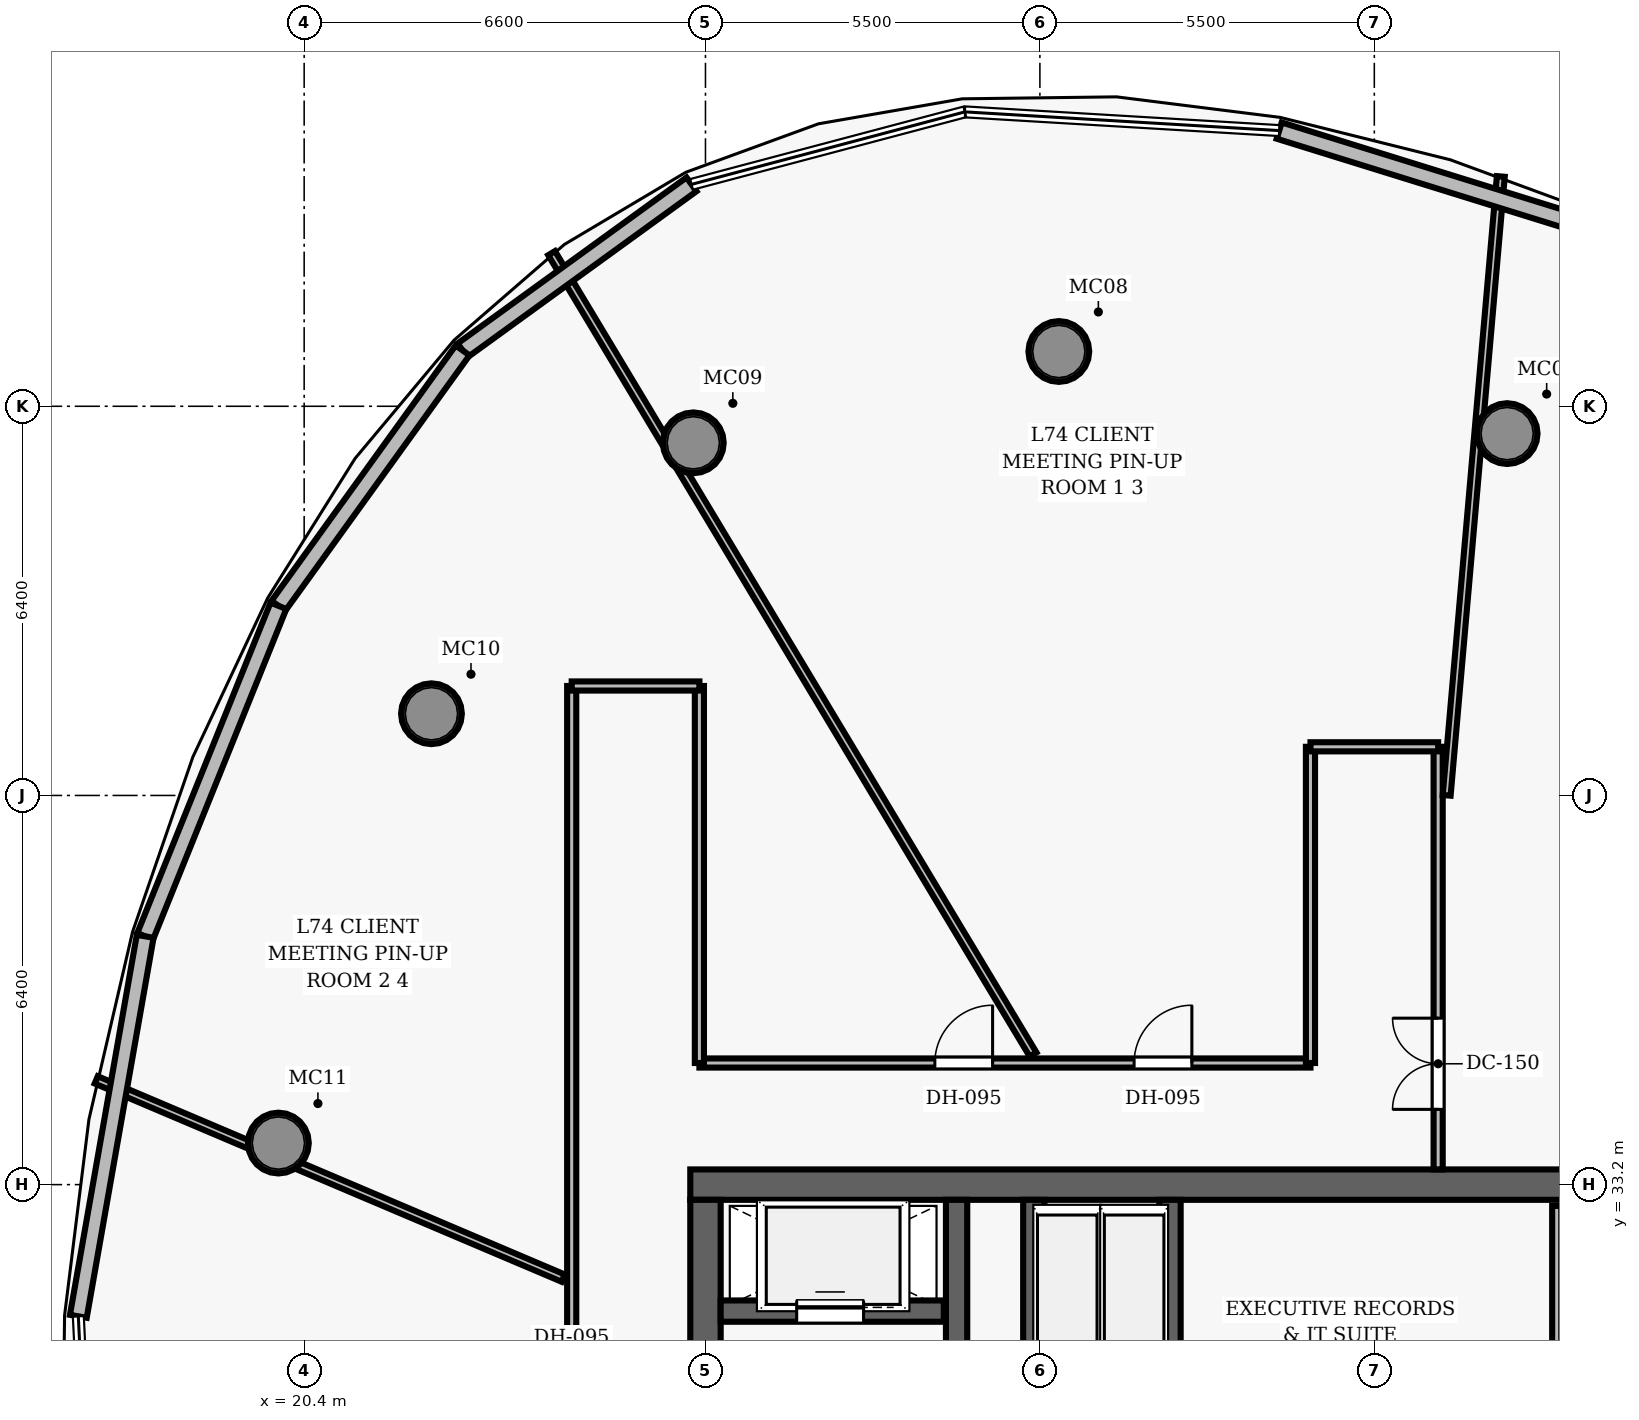
"""IFC4 building model, lengths in metres.
Left out: names, types, materials, properties, quantities, classifications, styles, units other than length and angle.
Written with IfcOpenShell. Run it as: python <this file> out.ifc"""

import sys

from ifc_helpers import new_model, si_unit, direction, frame, frame_2d, origin, origin_2d, place, context, subcontext, project, spatial, rectangle, hollow_circle, extrude, element, fill, save


model = new_model("IFC4")
c1 = context("Model", 3, precision=1e-05, world=origin(), true_north=direction((0.0, 1.0)))
c2 = subcontext(c1, "Body", "Model", "MODEL_VIEW")
j1 = project(units=[si_unit("LENGTHUNIT", "METRE"), si_unit("PLANEANGLEUNIT", "RADIAN")], contexts=[c1])
p1 = place(None, origin())
s1 = spatial("IfcSite", under=j1, at=p1, CompositionType="ELEMENT")
p2 = place(p1, origin())
s2 = spatial("IfcBuilding", under=s1, at=p2, CompositionType="ELEMENT")
p3 = place(p2, frame((0.0, 0.0, 292.1)))
s3 = spatial("IfcBuildingStorey", under=s2, at=p3, CompositionType="ELEMENT", Elevation=292.1)
p4 = place(p3, frame((26.75, 33.2, 0.0), z_axis=(0.0, 0.0, 1.0), x_axis=(1.0, 0.0, 0.0)))
e1 = element("IfcWall", 1, at=p4, inside=s3, PredefinedType="SHEAR", context=c2, shape_type="SweptSolid", body=[
    extrude(rectangle(XDim=22.5, YDim=0.5, at=frame_2d((11.25, 0.0))), origin(), (0.0, 0.0, 1.0), 3.85),
])
p5 = place(p3, frame((27.0, 19.05, 0.0), z_axis=(0.0, 0.0, 1.0), x_axis=(0.0, 1.0, 0.0)))
e2 = element("IfcWall", 2, at=p5, inside=s3, PredefinedType="SHEAR", context=c2, shape_type="SweptSolid", body=[
    extrude(rectangle(XDim=13.9, YDim=0.5, at=frame_2d((6.95, 0.0))), origin(), (0.0, 0.0, 1.0), 3.85),
])
p6 = place(p5, frame((8.2, 0.0, 0.0)))
e3 = element("IfcOpeningElement", 3, at=p6, cuts=e2, PredefinedType="OPENING", context=c2, shape_type="SweptSolid", body=[
    extrude(rectangle(XDim=1.05, YDim=2.15, at=frame_2d((0.525, 1.075))), frame((0.0, 0.26, 0.0), z_axis=(0.0, -1.0, 0.0), x_axis=(1.0, 0.0, 0.0)), (0.0, 0.0, 1.0), 0.52),
])
p7 = place(p3, frame((31.13, 19.05, 0.0), z_axis=(0.0, 0.0, 1.0), x_axis=(0.0, 1.0, 0.0)))
e4 = element("IfcWall", 4, at=p7, inside=s3, PredefinedType="SHEAR", context=c2, shape_type="SweptSolid", body=[
    extrude(rectangle(XDim=13.9, YDim=0.35, at=frame_2d((6.95, 0.0))), origin(), (0.0, 0.0, 1.0), 3.85),
])
for number, where, z_axis, x_axis in (
    (5, (40.185, 45.551, 0.0), (0.0, 0.0, 1.0), (1.0, 0.0, 0.0)),
    (6, (32.812, 46.901, 0.0), (0.0, 0.0, 1.0), (1.0, 0.0, 0.0)),
    (7, (26.8, 45.399, 0.0), (0.0, 0.0, 1.0), (1.0, 0.0, 0.0)),
    (8, (22.494, 40.944, 0.0), (0.0, 0.0, 1.0), (1.0, 0.0, 0.0)),
    (9, (19.976, 33.884, 0.0), (0.0, 0.0, 1.0), (1.0, 0.0, 0.0)),
):
    element("IfcColumn", number, at=place(p3, frame(where, z_axis=z_axis, x_axis=x_axis)), inside=s3, PredefinedType="COLUMN", context=c2, shape_type="SweptSolid", body=[
        extrude(hollow_circle(Radius=0.5, WallThickness=0.045, at=origin_2d()), origin(), (0.0, 0.0, 1.0), 3.85),
    ])
p8 = place(p3, frame((27.25, 31.12, 0.0), z_axis=(0.0, 0.0, 1.0), x_axis=(1.0, 0.0, 0.0)))
e10 = element("IfcWall", 10, at=p8, inside=s3, PredefinedType="SHEAR", context=c2, shape_type="SweptSolid", body=[
    extrude(rectangle(XDim=3.67, YDim=0.35, at=frame_2d((1.835, 0.0))), origin(), (0.0, 0.0, 1.0), 3.04),
])
p9 = place(p8, frame((1.25, 0.0, 0.0)))
e11 = element("IfcOpeningElement", 11, at=p9, cuts=e10, PredefinedType="OPENING", context=c2, shape_type="SweptSolid", body=[
    extrude(rectangle(XDim=1.1, YDim=2.15, at=frame_2d((0.55, 1.075))), frame((0.0, 0.185, 0.0), z_axis=(0.0, -1.0, 0.0), x_axis=(1.0, 0.0, 0.0)), (0.0, 0.0, 1.0), 0.37),
])
p10 = place(p3, frame((34.64, 26.69, 0.0), z_axis=(0.0, 0.0, 1.0), x_axis=(0.0, 1.0, 0.0)))
e12 = element("IfcWall", 12, at=p10, inside=s3, PredefinedType="SHEAR", context=c2, shape_type="SweptSolid", body=[
    extrude(rectangle(XDim=6.26, YDim=0.35, at=frame_2d((3.13, 0.0))), origin(), (0.0, 0.0, 1.0), 3.85),
])
p11 = place(p10, frame((0.85, 0.0, 0.0)))
e13 = element("IfcOpeningElement", 13, at=p11, cuts=e12, PredefinedType="OPENING", context=c2, shape_type="SweptSolid", body=[
    extrude(rectangle(XDim=1.05, YDim=2.15, at=frame_2d((0.525, 1.075))), frame((0.0, 0.185, 0.0), z_axis=(0.0, -1.0, 0.0), x_axis=(1.0, 0.0, 0.0)), (0.0, 0.0, 1.0), 0.37),
])
p12 = place(p3, frame((32.4, 30.22, 0.0), z_axis=(0.0, 0.0, 1.0), x_axis=(0.0, 1.0, 0.0)))
e14 = element("IfcWall", 14, at=p12, inside=s3, PredefinedType="SHEAR", context=c2, shape_type="SweptSolid", body=[
    extrude(rectangle(XDim=2.73, YDim=0.35, at=frame_2d((1.365, 0.0))), origin(), (0.0, 0.0, 1.0), 3.04),
])
p13 = place(p3, frame((41.0, 28.95, 0.0), z_axis=(0.0, 0.0, 1.0), x_axis=(0.0, 1.0, 0.0)))
e15 = element("IfcWall", 15, at=p13, inside=s3, PredefinedType="PARTITIONING", context=c2, shape_type="SweptSolid", body=[
    extrude(rectangle(XDim=3.9, YDim=0.15, at=frame_2d((1.95, 0.0))), origin(), (0.0, 0.0, 1.0), 3.04),
])
p14 = place(p13, frame((0.7, 0.0, 0.0)))
e16 = element("IfcOpeningElement", 16, at=p14, cuts=e15, PredefinedType="OPENING", context=c2, shape_type="SweptSolid", body=[
    extrude(rectangle(XDim=0.85, YDim=2.1, at=frame_2d((0.425, 1.05))), frame((0.0, 0.085, 0.0), z_axis=(0.0, -1.0, 0.0), x_axis=(1.0, 0.0, 0.0)), (0.0, 0.0, 1.0), 0.17),
])
p15 = place(p3, frame((26.9, 35.2, 0.0), z_axis=(0.0, 0.0, 1.0), x_axis=(1.0, 0.0, 0.0)))
e17 = element("IfcWall", 17, at=p15, inside=s3, PredefinedType="PARTITIONING", context=c2, shape_type="SweptSolid", body=[
    extrude(rectangle(XDim=10.05, YDim=0.15, at=frame_2d((5.025, 0.0))), origin(), (0.0, 0.0, 1.0), 3.04),
])
p16 = place(p15, frame((7.149, 0.0, 0.0)))
e18 = element("IfcOpeningElement", 18, at=p16, cuts=e17, PredefinedType="OPENING", context=c2, shape_type="SweptSolid", body=[
    extrude(rectangle(XDim=0.95, YDim=2.15, at=frame_2d((0.475, 1.075))), frame((0.0, 0.085, 0.0), z_axis=(0.0, -1.0, 0.0), x_axis=(1.0, 0.0, 0.0)), (0.0, 0.0, 1.0), 0.17),
])
p17 = place(p15, frame((3.872, 0.0, 0.0)))
e19 = element("IfcOpeningElement", 19, at=p17, cuts=e17, PredefinedType="OPENING", context=c2, shape_type="SweptSolid", body=[
    extrude(rectangle(XDim=0.95, YDim=2.15, at=frame_2d((0.475, 1.075))), frame((0.0, 0.085, 0.0), z_axis=(0.0, -1.0, 0.0), x_axis=(1.0, 0.0, 0.0)), (0.0, 0.0, 1.0), 0.17),
])
p18 = place(p3, frame((24.8, 11.222, 0.0), z_axis=(0.0, 0.0, 1.0), x_axis=(0.0, 1.0, 0.0)))
e20 = element("IfcWall", 20, at=p18, inside=s3, PredefinedType="PARTITIONING", context=c2, shape_type="SweptSolid", body=[
    extrude(rectangle(XDim=30.177, YDim=0.15, at=frame_2d((15.089, 0.0))), origin(), (0.0, 0.0, 1.0), 3.04),
])
p19 = place(p18, frame((17.923, 0.0, 0.0)))
e21 = element("IfcOpeningElement", 21, at=p19, cuts=e20, PredefinedType="OPENING", context=c2, shape_type="SweptSolid", body=[
    extrude(rectangle(XDim=0.95, YDim=2.15, at=frame_2d((0.475, 1.075))), frame((0.0, 0.085, 0.0), z_axis=(0.0, -1.0, 0.0), x_axis=(1.0, 0.0, 0.0)), (0.0, 0.0, 1.0), 0.17),
])
p20 = place(p18, frame((8.524, 0.0, 0.0)))
e22 = element("IfcOpeningElement", 22, at=p20, cuts=e20, PredefinedType="OPENING", context=c2, shape_type="SweptSolid", body=[
    extrude(rectangle(XDim=0.95, YDim=2.15, at=frame_2d((0.475, 1.075))), frame((0.0, 0.085, 0.0), z_axis=(0.0, -1.0, 0.0), x_axis=(1.0, 0.0, 0.0)), (0.0, 0.0, 1.0), 0.17),
])
p21 = place(p3, frame((26.9, 35.2, 0.0), z_axis=(0.0, 0.0, 1.0), x_axis=(0.0, 1.0, 0.0)))
e23 = element("IfcWall", 23, at=p21, inside=s3, PredefinedType="PARTITIONING", context=c2, shape_type="SweptSolid", body=[
    extrude(rectangle(XDim=6.2, YDim=0.15, at=frame_2d((3.1, 0.0))), origin(), (0.0, 0.0, 1.0), 3.04),
])
p22 = place(p3, frame((24.8, 41.4, 0.0), z_axis=(0.0, 0.0, 1.0), x_axis=(1.0, 0.0, 0.0)))
e24 = element("IfcWall", 24, at=p22, inside=s3, PredefinedType="PARTITIONING", context=c2, shape_type="SweptSolid", body=[
    extrude(rectangle(XDim=2.1, YDim=0.15, at=frame_2d((1.05, 0.0))), origin(), (0.0, 0.0, 1.0), 3.04),
])
p23 = place(p3, frame((36.95, 35.2, 0.0), z_axis=(0.0, 0.0, 1.0), x_axis=(0.0, 1.0, 0.0)))
e25 = element("IfcWall", 25, at=p23, inside=s3, PredefinedType="PARTITIONING", context=c2, shape_type="SweptSolid", body=[
    extrude(rectangle(XDim=5.2, YDim=0.15, at=frame_2d((2.6, 0.0))), origin(), (0.0, 0.0, 1.0), 3.04),
])
p24 = place(p3, frame((39.05, 33.45, 0.0), z_axis=(0.0, 0.0, 1.0), x_axis=(0.0, 1.0, 0.0)))
e26 = element("IfcWall", 26, at=p24, inside=s3, PredefinedType="PARTITIONING", context=c2, shape_type="SweptSolid", body=[
    extrude(rectangle(XDim=6.95, YDim=0.15, at=frame_2d((3.475, 0.0))), origin(), (0.0, 0.0, 1.0), 3.04),
])
p25 = place(p24, frame((0.988, 0.0, 0.0)))
e27 = element("IfcOpeningElement", 27, at=p25, cuts=e26, PredefinedType="OPENING", context=c2, shape_type="SweptSolid", body=[
    extrude(rectangle(XDim=1.5, YDim=2.2, at=frame_2d((0.75, 1.1))), frame((0.0, 0.085, 0.0), z_axis=(0.0, -1.0, 0.0), x_axis=(1.0, 0.0, 0.0)), (0.0, 0.0, 1.0), 0.17),
])
p26 = place(p3, frame((36.95, 40.4, 0.0), z_axis=(0.0, 0.0, 1.0), x_axis=(1.0, 0.0, 0.0)))
e28 = element("IfcWall", 28, at=p26, inside=s3, PredefinedType="PARTITIONING", context=c2, shape_type="SweptSolid", body=[
    extrude(rectangle(XDim=2.1, YDim=0.15, at=frame_2d((1.05, 0.0))), origin(), (0.0, 0.0, 1.0), 3.04),
])
p27 = place(p3, frame((39.19, 39.602, 0.0), z_axis=(0.0, 0.0, 1.0), x_axis=(0.087171989562, 0.996193276546, 0.0)))
e29 = element("IfcWall", 29, at=p27, inside=s3, PredefinedType="PARTITIONING", context=c2, shape_type="SweptSolid", body=[
    extrude(rectangle(XDim=10.217, YDim=0.13, at=frame_2d((5.108, 0.0))), origin(), (0.0, 0.0, 1.0), 3.04),
])
p28 = place(p3, frame((32.388, 35.34, 0.0), z_axis=(0.0, 0.0, 1.0), x_axis=(-0.515046773067, 0.857162074262, 0.0)))
e30 = element("IfcWall", 30, at=p28, inside=s3, PredefinedType="PARTITIONING", context=c2, shape_type="SweptSolid", body=[
    extrude(rectangle(XDim=15.374, YDim=0.13, at=frame_2d((7.687, 0.0))), origin(), (0.0, 0.0, 1.0), 3.04),
])
p29 = place(p3, frame((24.66, 31.663, 0.0), z_axis=(0.0, 0.0, 1.0), x_axis=(-0.920507798558, 0.390724190182, 0.0)))
e31 = element("IfcWall", 31, at=p29, inside=s3, PredefinedType="PARTITIONING", context=c2, shape_type="SweptSolid", body=[
    extrude(rectangle(XDim=8.343, YDim=0.13, at=frame_2d((4.171, 0.0))), origin(), (0.0, 0.0, 1.0), 3.04),
])
p30 = place(p3, frame((36.436, 50.534, 0.0), z_axis=(0.0, 0.0, 1.0), x_axis=(0.955052748682, -0.296435907467, 0.0)))
e32 = element("IfcWall", 32, at=p30, inside=s3, PredefinedType="SOLIDWALL", context=c2, shape_type="SweptSolid", body=[
    extrude(rectangle(XDim=5.86, YDim=0.28, at=frame_2d((2.93, 0.0))), origin(), (0.0, 0.0, 1.0), 3.625),
])
p31 = place(p3, frame((23.006, 46.919, 0.0), z_axis=(0.0, 0.0, 1.0), x_axis=(0.809541210108, 0.587063053799, 0.0)))
e33 = element("IfcWall", 33, at=p31, inside=s3, PredefinedType="SOLIDWALL", context=c2, shape_type="SweptSolid", body=[
    extrude(rectangle(XDim=4.651, YDim=0.28, at=frame_2d((2.325, 0.0))), origin(), (0.0, 0.0, 1.0), 3.625),
])
p32 = place(p3, frame((19.976, 42.719, 0.0), z_axis=(0.0, 0.0, 1.0), x_axis=(0.584915544866, 0.811094202528, 0.0)))
e34 = element("IfcWall", 34, at=p32, inside=s3, PredefinedType="SOLIDWALL", context=c2, shape_type="SweptSolid", body=[
    extrude(rectangle(XDim=5.179, YDim=0.28, at=frame_2d((2.589, 0.0))), origin(), (0.0, 0.0, 1.0), 3.625),
])
p33 = place(p3, frame((17.785, 37.283, 0.0), z_axis=(0.0, 0.0, 1.0), x_axis=(0.373910536535, 0.927464775972, 0.0)))
e35 = element("IfcWall", 35, at=p33, inside=s3, PredefinedType="SOLIDWALL", context=c2, shape_type="SweptSolid", body=[
    extrude(rectangle(XDim=5.86, YDim=0.28, at=frame_2d((2.93, 0.0))), origin(), (0.0, 0.0, 1.0), 3.625),
])
p34 = place(p3, frame((16.686, 31.034, 0.0), z_axis=(0.0, 0.0, 1.0), x_axis=(0.173258520221, 0.984876380654, 0.0)))
e36 = element("IfcWall", 36, at=p34, inside=s3, PredefinedType="SOLIDWALL", context=c2, shape_type="SweptSolid", body=[
    extrude(rectangle(XDim=6.345, YDim=0.28, at=frame_2d((3.173, 0.0))), origin(), (0.0, 0.0, 1.0), 3.625),
])
p35 = place(p25, origin())
e37 = element("IfcDoor", 37, at=p35, inside=s3, OperationType="DOUBLE_DOOR_SINGLE_SWING", PredefinedType="DOOR", context=c2, shape_type="SweptSolid", body=[
    extrude(rectangle(XDim=1.5, YDim=2.2, at=frame_2d((0.75, 1.1))), frame((0.0, 0.025, 0.0), z_axis=(0.0, -1.0, 0.0), x_axis=(1.0, 0.0, 0.0)), (0.0, 0.0, 1.0), 0.05),
])
fill(e27, e37)
p36 = place(p16, origin())
e38 = element("IfcDoor", 38, at=p36, inside=s3, OperationType="SINGLE_SWING_RIGHT", PredefinedType="DOOR", context=c2, shape_type="SweptSolid", body=[
    extrude(rectangle(XDim=0.95, YDim=2.15, at=frame_2d((0.475, 1.075))), frame((0.0, 0.025, 0.0), z_axis=(0.0, -1.0, 0.0), x_axis=(1.0, 0.0, 0.0)), (0.0, 0.0, 1.0), 0.05),
])
fill(e18, e38)
p37 = place(p17, origin())
e39 = element("IfcDoor", 39, at=p37, inside=s3, OperationType="SINGLE_SWING_RIGHT", PredefinedType="DOOR", context=c2, shape_type="SweptSolid", body=[
    extrude(rectangle(XDim=0.95, YDim=2.15, at=frame_2d((0.475, 1.075))), frame((0.0, 0.025, 0.0), z_axis=(0.0, -1.0, 0.0), x_axis=(1.0, 0.0, 0.0)), (0.0, 0.0, 1.0), 0.05),
])
fill(e19, e39)
p38 = place(p9, origin())
e40 = element("IfcDoor", 40, at=p38, inside=s3, OperationType="SLIDING_TO_LEFT", PredefinedType="DOOR", context=c2, shape_type="SweptSolid", body=[
    extrude(rectangle(XDim=1.1, YDim=2.15, at=frame_2d((0.55, 1.075))), frame((0.0, 0.025, 0.0), z_axis=(0.0, -1.0, 0.0), x_axis=(1.0, 0.0, 0.0)), (0.0, 0.0, 1.0), 0.05),
])
fill(e11, e40)
save(model, sys.argv[1])
